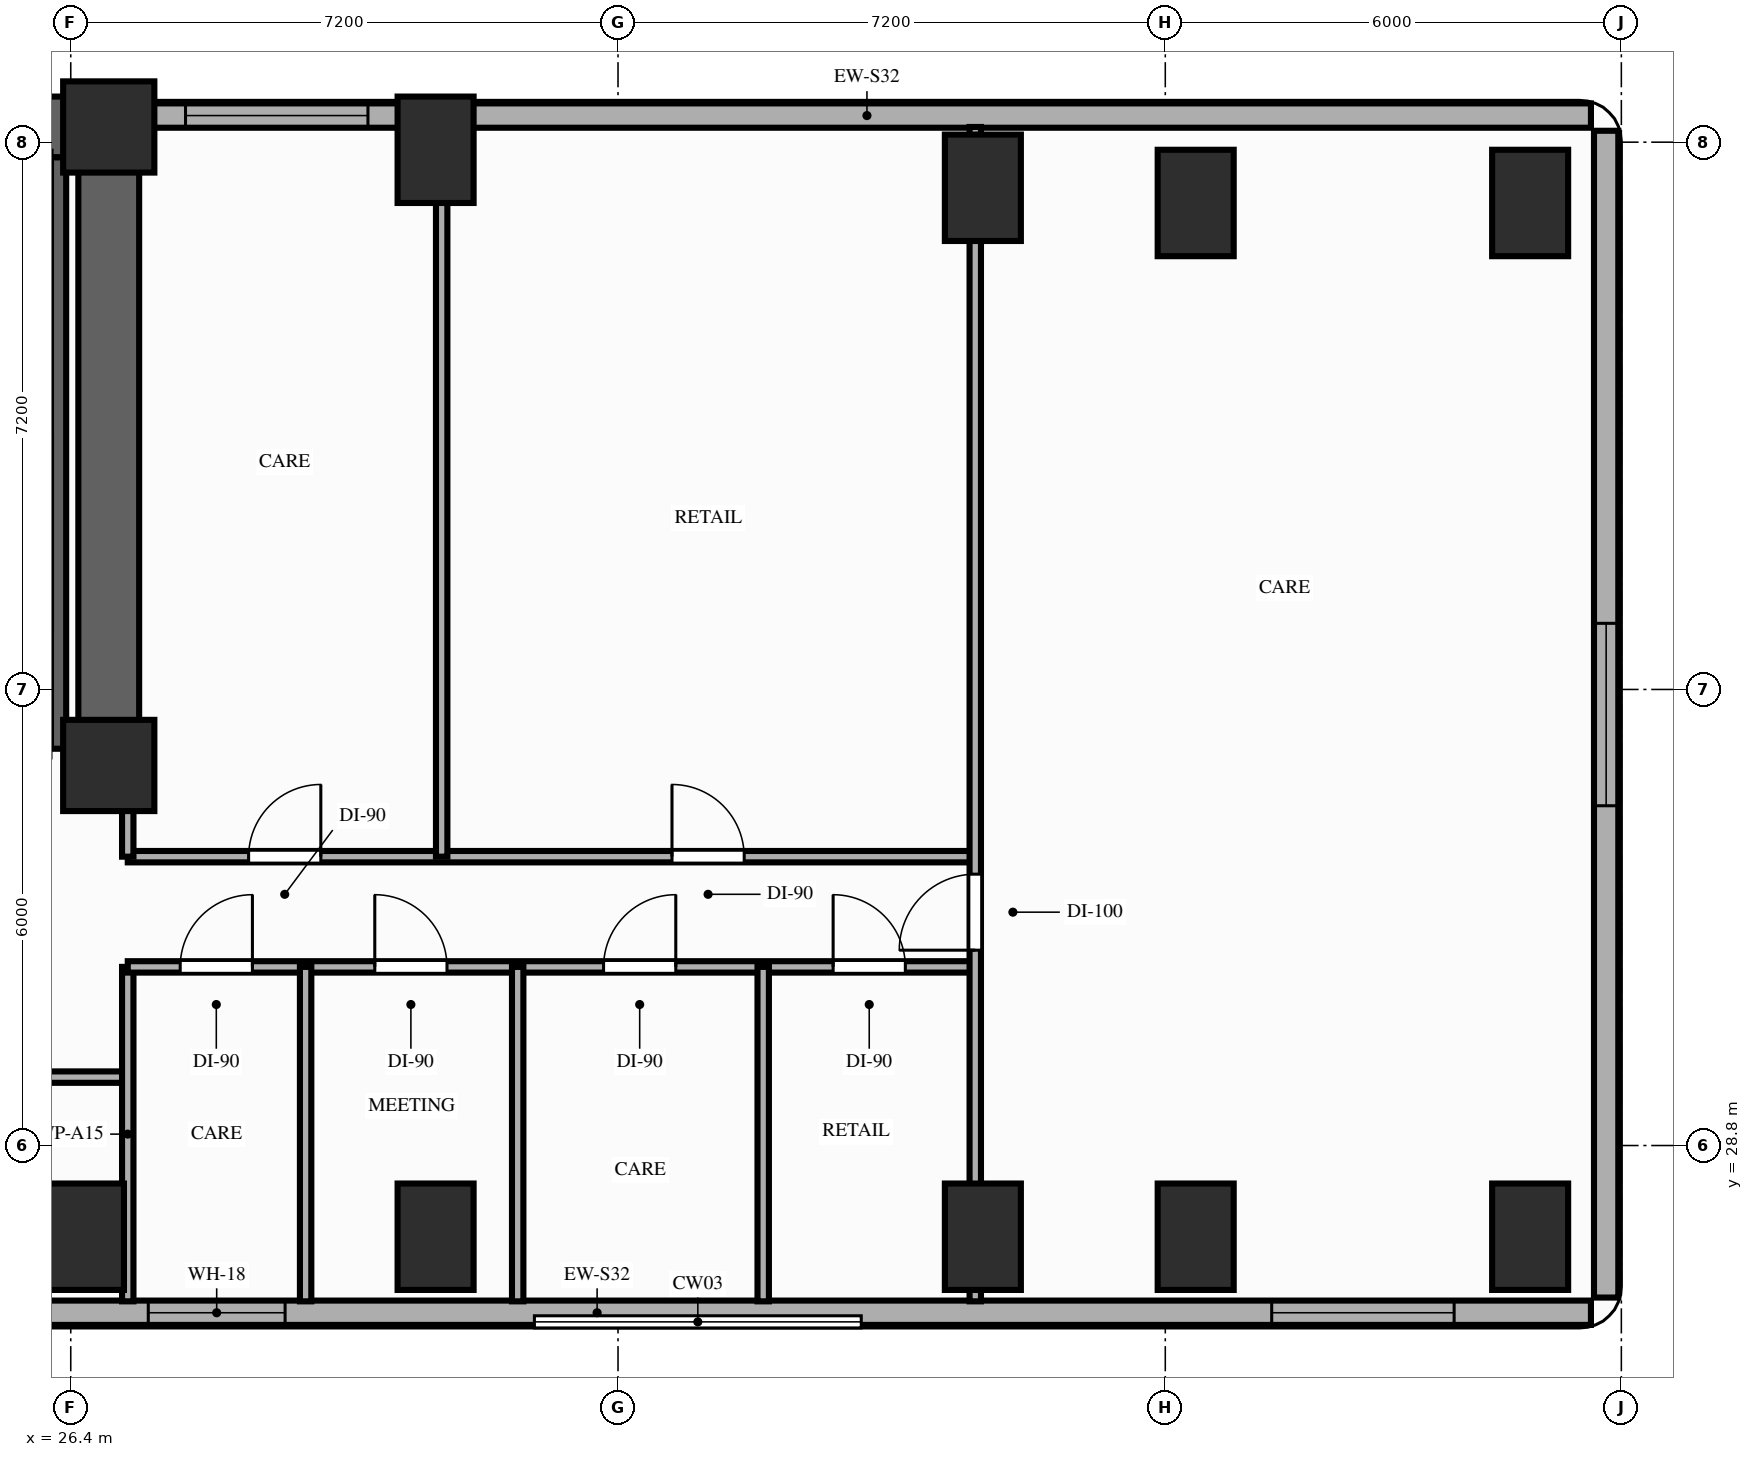
"""IFC4 building model, lengths in metres.
Left out: names, types, materials, properties, quantities, classifications, styles, units other than length and angle.
Written with IfcOpenShell. Run it as: python <this file> out.ifc"""

import sys

from ifc_helpers import new_model, si_unit, direction, frame, frame_2d, origin, origin_2d, place, context, subcontext, project, spatial, rectangle, extrude, element, fill, save


model = new_model("IFC4")
c1 = context("Model", 3, precision=1e-05, world=origin(), true_north=direction((0.0, 1.0)))
c2 = subcontext(c1, "Body", "Model", "MODEL_VIEW")
j1 = project(units=[si_unit("LENGTHUNIT", "METRE"), si_unit("PLANEANGLEUNIT", "RADIAN")], contexts=[c1])
p1 = place(None, origin())
s1 = spatial("IfcSite", under=j1, at=p1, CompositionType="ELEMENT")
p2 = place(p1, origin())
s2 = spatial("IfcBuilding", under=s1, at=p2, CompositionType="ELEMENT")
p3 = place(p2, frame((0.0, 0.0, 53.2)))
s3 = spatial("IfcBuildingStorey", under=s2, at=p3, CompositionType="ELEMENT", Elevation=53.2)
for number, where, z_axis, x_axis in (
    (1, (26.9, 33.8, 0.0), (0.0, 0.0, 1.0), (1.0, 0.0, 0.0)),
    (2, (26.9, 42.2, 0.0), (0.0, 0.0, 1.0), (1.0, 0.0, 0.0)),
):
    element("IfcColumn", number, at=place(p3, frame(where, z_axis=z_axis, x_axis=x_axis)), inside=s3, PredefinedType="COLUMN", context=c2, shape_type="SweptSolid", body=[
        extrude(rectangle(XDim=1.2, YDim=1.2, at=origin_2d()), origin(), (0.0, 0.0, 1.0), 3.2),
    ])
for number, where, z_axis, x_axis in (
    (3, (26.6, 27.6, 0.0), (0.0, 0.0, 1.0), (1.0, 0.0, 0.0)),
    (4, (31.2, 27.6, 0.0), (0.0, 0.0, 1.0), (1.0, 0.0, 0.0)),
    (5, (31.2, 41.9, 0.0), (0.0, 0.0, 1.0), (1.0, 0.0, 0.0)),
    (6, (38.4, 27.6, 0.0), (0.0, 0.0, 1.0), (1.0, 0.0, 0.0)),
    (7, (38.4, 41.4, 0.0), (0.0, 0.0, 1.0), (1.0, 0.0, 0.0)),
    (8, (41.2, 27.6, 0.0), (0.0, 0.0, 1.0), (1.0, 0.0, 0.0)),
    (9, (41.2, 41.2, 0.0), (0.0, 0.0, 1.0), (1.0, 0.0, 0.0)),
    (10, (45.6, 27.6, 0.0), (0.0, 0.0, 1.0), (1.0, 0.0, 0.0)),
    (11, (45.6, 41.2, 0.0), (0.0, 0.0, 1.0), (1.0, 0.0, 0.0)),
):
    element("IfcColumn", number, at=place(p3, frame(where, z_axis=z_axis, x_axis=x_axis)), inside=s3, PredefinedType="COLUMN", context=c2, shape_type="SweptSolid", body=[
        extrude(rectangle(XDim=1.0, YDim=1.4, at=origin_2d()), origin(), (0.0, 0.0, 1.0), 3.2),
    ])
p4 = place(p3, frame((46.4, 42.35, 0.0), z_axis=(0.0, 0.0, 1.0), x_axis=(-1.0, 0.0, 0.0)))
e12 = element("IfcWall", 12, at=p4, inside=s3, PredefinedType="STANDARD", context=c2, shape_type="SweptSolid", body=[
    extrude(rectangle(XDim=19.05, YDim=0.32, at=frame_2d((9.525, 0.0))), origin(), (0.0, 0.0, 1.0), 2.41),
])
p5 = place(p4, frame((16.09, 0.0, 0.85)))
e13 = element("IfcOpeningElement", 13, at=p5, cuts=e12, PredefinedType="OPENING", context=c2, shape_type="SweptSolid", body=[
    extrude(rectangle(XDim=2.4, YDim=1.31, at=frame_2d((1.2, 0.655))), frame((0.0, 0.17, 0.0), z_axis=(0.0, -1.0, 0.0), x_axis=(1.0, 0.0, 0.0)), (0.0, 0.0, 1.0), 0.34),
])
p6 = place(p3, frame((20.25, 26.6, 0.0), z_axis=(0.0, 0.0, 1.0), x_axis=(1.0, 0.0, 0.0)))
e14 = element("IfcWall", 14, at=p6, inside=s3, PredefinedType="STANDARD", context=c2, shape_type="SweptSolid", body=[
    extrude(rectangle(XDim=26.15, YDim=0.32, at=frame_2d((13.075, 0.0))), origin(), (0.0, 0.0, 1.0), 2.71),
])
p7 = place(p6, frame((2.35, 0.0, 0.85)))
e15 = element("IfcOpeningElement", 15, at=p7, cuts=e14, PredefinedType="OPENING", context=c2, shape_type="SweptSolid", body=[
    extrude(rectangle(XDim=2.4, YDim=1.61, at=frame_2d((1.2, 0.805))), frame((0.0, 0.17, 0.0), z_axis=(0.0, -1.0, 0.0), x_axis=(1.0, 0.0, 0.0)), (0.0, 0.0, 1.0), 0.34),
])
p8 = place(p6, frame((7.17, 0.0, 0.85)))
e16 = element("IfcOpeningElement", 16, at=p8, cuts=e14, PredefinedType="OPENING", context=c2, shape_type="SweptSolid", body=[
    extrude(rectangle(XDim=1.8, YDim=1.61, at=frame_2d((0.9, 0.805))), frame((0.0, 0.17, 0.0), z_axis=(0.0, -1.0, 0.0), x_axis=(1.0, 0.0, 0.0)), (0.0, 0.0, 1.0), 0.34),
])
p9 = place(p6, frame((21.95, 0.0, 0.85)))
e17 = element("IfcOpeningElement", 17, at=p9, cuts=e14, PredefinedType="OPENING", context=c2, shape_type="SweptSolid", body=[
    extrude(rectangle(XDim=2.4, YDim=1.61, at=frame_2d((1.2, 0.805))), frame((0.0, 0.17, 0.0), z_axis=(0.0, -1.0, 0.0), x_axis=(1.0, 0.0, 0.0)), (0.0, 0.0, 1.0), 0.34),
])
p10 = place(p3, frame((46.6, 26.8, 0.0), z_axis=(0.0, 0.0, 1.0), x_axis=(0.0, 1.0, 0.0)))
e18 = element("IfcWall", 18, at=p10, inside=s3, PredefinedType="STANDARD", context=c2, shape_type="SweptSolid", body=[
    extrude(rectangle(XDim=15.35, YDim=0.32, at=frame_2d((7.675, 0.0))), origin(), (0.0, 0.0, 1.0), 3.02),
])
p11 = place(p10, frame((6.47, 0.0, 0.85)))
e19 = element("IfcOpeningElement", 19, at=p11, cuts=e18, PredefinedType="OPENING", context=c2, shape_type="SweptSolid", body=[
    extrude(rectangle(XDim=2.4, YDim=1.8, at=frame_2d((1.2, 0.9))), frame((0.0, 0.17, 0.0), z_axis=(0.0, -1.0, 0.0), x_axis=(1.0, 0.0, 0.0)), (0.0, 0.0, 1.0), 0.34),
])
p12 = place(p3, frame((6.45, 42.2, 0.0), z_axis=(0.0, 0.0, 1.0), x_axis=(1.0, 0.0, 0.0)))
e20 = element("IfcWall", 20, at=p12, inside=s3, PredefinedType="SHEAR", context=c2, shape_type="SweptSolid", body=[
    extrude(rectangle(XDim=20.45, YDim=0.8, at=frame_2d((10.225, 0.0))), origin(), (0.0, 0.0, 1.0), 3.02),
])
p13 = place(p3, frame((26.9, 33.8, 0.0), z_axis=(0.0, 0.0, 1.0), x_axis=(0.0, 1.0, 0.0)))
e21 = element("IfcWall", 21, at=p13, inside=s3, PredefinedType="SHEAR", context=c2, shape_type="SweptSolid", body=[
    extrude(rectangle(XDim=7.95, YDim=0.8, at=frame_2d((3.975, 0.0))), origin(), (0.0, 0.0, 1.0), 3.02),
])
p14 = place(p3, frame((26.24, 34.02, 0.0), z_axis=(0.0, 0.0, 1.0), x_axis=(0.0, 1.0, 0.0)))
e22 = element("IfcWall", 22, at=p14, inside=s3, PredefinedType="SHEAR", context=c2, shape_type="SweptSolid", body=[
    extrude(rectangle(XDim=7.78, YDim=0.2, at=frame_2d((3.89, 0.0))), origin(), (0.0, 0.0, 1.0), 3.02),
])
p15 = place(p3, frame((20.45, 29.7, 0.0), z_axis=(0.0, 0.0, 1.0), x_axis=(1.0, 0.0, 0.0)))
e23 = element("IfcWall", 23, at=p15, inside=s3, PredefinedType="PARTITIONING", context=c2, shape_type="SweptSolid", body=[
    extrude(rectangle(XDim=6.7, YDim=0.15, at=frame_2d((3.35, 0.0))), origin(), (0.0, 0.0, 1.0), 3.02),
])
p16 = place(p15, frame((2.8, 0.0, 0.0)))
e24 = element("IfcOpeningElement", 24, at=p16, cuts=e23, PredefinedType="OPENING", context=c2, shape_type="SweptSolid", body=[
    extrude(rectangle(XDim=0.95, YDim=2.15, at=frame_2d((0.475, 1.075))), frame((0.0, 0.085, 0.0), z_axis=(0.0, -1.0, 0.0), x_axis=(1.0, 0.0, 0.0)), (0.0, 0.0, 1.0), 0.17),
])
p17 = place(p3, frame((27.15, 26.75, 0.0), z_axis=(0.0, 0.0, 1.0), x_axis=(0.0, 1.0, 0.0)))
e25 = element("IfcWall", 25, at=p17, inside=s3, PredefinedType="PARTITIONING", context=c2, shape_type="SweptSolid", body=[
    extrude(rectangle(XDim=4.4, YDim=0.15, at=frame_2d((2.2, 0.0))), origin(), (0.0, 0.0, 1.0), 2.41),
])
p18 = place(p3, frame((27.15, 31.15, 0.0), z_axis=(0.0, 0.0, 1.0), x_axis=(1.0, 0.0, 0.0)))
e26 = element("IfcWall", 26, at=p18, inside=s3, PredefinedType="PARTITIONING", context=c2, shape_type="SweptSolid", body=[
    extrude(rectangle(XDim=11.15, YDim=0.15, at=frame_2d((5.575, 0.0))), origin(), (0.0, 0.0, 1.0), 2.41),
])
p19 = place(p18, frame((0.69, 0.0, 0.0)))
e27 = element("IfcOpeningElement", 27, at=p19, cuts=e26, PredefinedType="OPENING", context=c2, shape_type="SweptSolid", body=[
    extrude(rectangle(XDim=0.95, YDim=2.15, at=frame_2d((0.475, 1.075))), frame((0.0, 0.085, 0.0), z_axis=(0.0, -1.0, 0.0), x_axis=(1.0, 0.0, 0.0)), (0.0, 0.0, 1.0), 0.17),
])
p20 = place(p18, frame((3.25, 0.0, 0.0)))
e28 = element("IfcOpeningElement", 28, at=p20, cuts=e26, PredefinedType="OPENING", context=c2, shape_type="SweptSolid", body=[
    extrude(rectangle(XDim=0.95, YDim=2.15, at=frame_2d((0.475, 1.075))), frame((0.0, 0.085, 0.0), z_axis=(0.0, -1.0, 0.0), x_axis=(1.0, 0.0, 0.0)), (0.0, 0.0, 1.0), 0.17),
])
p21 = place(p18, frame((6.26, 0.0, 0.0)))
e29 = element("IfcOpeningElement", 29, at=p21, cuts=e26, PredefinedType="OPENING", context=c2, shape_type="SweptSolid", body=[
    extrude(rectangle(XDim=0.95, YDim=2.15, at=frame_2d((0.475, 1.075))), frame((0.0, 0.085, 0.0), z_axis=(0.0, -1.0, 0.0), x_axis=(1.0, 0.0, 0.0)), (0.0, 0.0, 1.0), 0.17),
])
p22 = place(p18, frame((9.28, 0.0, 0.0)))
e30 = element("IfcOpeningElement", 30, at=p22, cuts=e26, PredefinedType="OPENING", context=c2, shape_type="SweptSolid", body=[
    extrude(rectangle(XDim=0.95, YDim=2.15, at=frame_2d((0.475, 1.075))), frame((0.0, 0.085, 0.0), z_axis=(0.0, -1.0, 0.0), x_axis=(1.0, 0.0, 0.0)), (0.0, 0.0, 1.0), 0.17),
])
p23 = place(p3, frame((27.15, 32.6, 0.0), z_axis=(0.0, 0.0, 1.0), x_axis=(1.0, 0.0, 0.0)))
e31 = element("IfcWall", 31, at=p23, inside=s3, PredefinedType="PARTITIONING", context=c2, shape_type="SweptSolid", body=[
    extrude(rectangle(XDim=11.15, YDim=0.15, at=frame_2d((5.575, 0.0))), origin(), (0.0, 0.0, 1.0), 2.41),
])
p24 = place(p23, frame((1.59, 0.0, 0.0)))
e32 = element("IfcOpeningElement", 32, at=p24, cuts=e31, PredefinedType="OPENING", context=c2, shape_type="SweptSolid", body=[
    extrude(rectangle(XDim=0.95, YDim=2.15, at=frame_2d((0.475, 1.075))), frame((0.0, 0.085, 0.0), z_axis=(0.0, -1.0, 0.0), x_axis=(1.0, 0.0, 0.0)), (0.0, 0.0, 1.0), 0.17),
])
p25 = place(p23, frame((7.16, 0.0, 0.0)))
e33 = element("IfcOpeningElement", 33, at=p25, cuts=e31, PredefinedType="OPENING", context=c2, shape_type="SweptSolid", body=[
    extrude(rectangle(XDim=0.95, YDim=2.15, at=frame_2d((0.475, 1.075))), frame((0.0, 0.085, 0.0), z_axis=(0.0, -1.0, 0.0), x_axis=(1.0, 0.0, 0.0)), (0.0, 0.0, 1.0), 0.17),
])
p26 = place(p3, frame((27.15, 32.6, 0.0), z_axis=(0.0, 0.0, 1.0), x_axis=(0.0, 1.0, 0.0)))
e34 = element("IfcWall", 34, at=p26, inside=s3, PredefinedType="PARTITIONING", context=c2, shape_type="SweptSolid", body=[
    extrude(rectangle(XDim=1.08, YDim=0.15, at=frame_2d((0.54, 0.0))), origin(), (0.0, 0.0, 1.0), 2.41),
])
p27 = place(p3, frame((38.3, 26.75, 0.0), z_axis=(0.0, 0.0, 1.0), x_axis=(0.0, 1.0, 0.0)))
e35 = element("IfcWall", 35, at=p27, inside=s3, PredefinedType="PARTITIONING", context=c2, shape_type="SweptSolid", body=[
    extrude(rectangle(XDim=15.45, YDim=0.15, at=frame_2d((7.725, 0.0))), origin(), (0.0, 0.0, 1.0), 2.41),
])
p28 = place(p27, frame((4.62, 0.0, 0.0)))
e36 = element("IfcOpeningElement", 36, at=p28, cuts=e35, PredefinedType="OPENING", context=c2, shape_type="SweptSolid", body=[
    extrude(rectangle(XDim=1.0, YDim=2.15, at=frame_2d((0.5, 1.075))), frame((0.0, 0.085, 0.0), z_axis=(0.0, -1.0, 0.0), x_axis=(1.0, 0.0, 0.0)), (0.0, 0.0, 1.0), 0.17),
])
for number, where, z_axis, x_axis in (
    (37, (29.49, 26.75, 0.0), (0.0, 0.0, 1.0), (0.0, 1.0, 0.0)),
    (38, (32.28, 26.75, 0.0), (0.0, 0.0, 1.0), (0.0, 1.0, 0.0)),
    (39, (35.51, 26.75, 0.0), (0.0, 0.0, 1.0), (0.0, 1.0, 0.0)),
):
    element("IfcWall", number, at=place(p3, frame(where, z_axis=z_axis, x_axis=x_axis)), inside=s3, PredefinedType="PARTITIONING", context=c2, shape_type="SweptSolid", body=[
        extrude(rectangle(XDim=4.4, YDim=0.15, at=frame_2d((2.2, 0.0))), origin(), (0.0, 0.0, 1.0), 2.41),
    ])
p29 = place(p3, frame((31.28, 32.6, 0.0), z_axis=(0.0, 0.0, 1.0), x_axis=(0.0, 1.0, 0.0)))
e40 = element("IfcWall", 40, at=p29, inside=s3, PredefinedType="PARTITIONING", context=c2, shape_type="SweptSolid", body=[
    extrude(rectangle(XDim=9.6, YDim=0.15, at=frame_2d((4.8, 0.0))), origin(), (0.0, 0.0, 1.0), 2.41),
])
p30 = place(p11, origin())
e41 = element("IfcWindow", 41, at=p30, inside=s3, PartitioningType="SINGLE_PANEL", PredefinedType="WINDOW", context=c2, shape_type="SweptSolid", body=[
    extrude(rectangle(XDim=2.4, YDim=1.8, at=frame_2d((1.2, 0.9))), frame((0.0, 0.03, 0.0), z_axis=(0.0, -1.0, 0.0), x_axis=(1.0, 0.0, 0.0)), (0.0, 0.0, 1.0), 0.06),
])
fill(e19, e41)
p31 = place(p8, origin())
e42 = element("IfcWindow", 42, at=p31, inside=s3, PartitioningType="SINGLE_PANEL", PredefinedType="WINDOW", context=c2, shape_type="SweptSolid", body=[
    extrude(rectangle(XDim=1.8, YDim=1.61, at=frame_2d((0.9, 0.805))), frame((0.0, 0.03, 0.0), z_axis=(0.0, -1.0, 0.0), x_axis=(1.0, 0.0, 0.0)), (0.0, 0.0, 1.0), 0.06),
])
fill(e16, e42)
p32 = place(p5, origin())
e43 = element("IfcWindow", 43, at=p32, inside=s3, PartitioningType="SINGLE_PANEL", PredefinedType="WINDOW", context=c2, shape_type="SweptSolid", body=[
    extrude(rectangle(XDim=2.4, YDim=1.31, at=frame_2d((1.2, 0.655))), frame((0.0, 0.03, 0.0), z_axis=(0.0, -1.0, 0.0), x_axis=(1.0, 0.0, 0.0)), (0.0, 0.0, 1.0), 0.06),
])
fill(e13, e43)
p33 = place(p9, origin())
e44 = element("IfcWindow", 44, at=p33, inside=s3, PartitioningType="SINGLE_PANEL", PredefinedType="WINDOW", context=c2, shape_type="SweptSolid", body=[
    extrude(rectangle(XDim=2.4, YDim=1.61, at=frame_2d((1.2, 0.805))), frame((0.0, 0.03, 0.0), z_axis=(0.0, -1.0, 0.0), x_axis=(1.0, 0.0, 0.0)), (0.0, 0.0, 1.0), 0.06),
])
fill(e17, e44)
p34 = place(p28, origin())
e45 = element("IfcDoor", 45, at=p34, inside=s3, OperationType="SINGLE_SWING_LEFT", PredefinedType="DOOR", context=c2, shape_type="SweptSolid", body=[
    extrude(rectangle(XDim=1.0, YDim=2.15, at=frame_2d((0.5, 1.075))), frame((0.0, 0.025, 0.0), z_axis=(0.0, -1.0, 0.0), x_axis=(1.0, 0.0, 0.0)), (0.0, 0.0, 1.0), 0.05),
])
fill(e36, e45)
p35 = place(p19, origin())
e46 = element("IfcDoor", 46, at=p35, inside=s3, OperationType="SINGLE_SWING_RIGHT", PredefinedType="DOOR", context=c2, shape_type="SweptSolid", body=[
    extrude(rectangle(XDim=0.95, YDim=2.15, at=frame_2d((0.475, 1.075))), frame((0.0, 0.025, 0.0), z_axis=(0.0, -1.0, 0.0), x_axis=(1.0, 0.0, 0.0)), (0.0, 0.0, 1.0), 0.05),
])
fill(e27, e46)
p36 = place(p20, origin())
e47 = element("IfcDoor", 47, at=p36, inside=s3, OperationType="SINGLE_SWING_LEFT", PredefinedType="DOOR", context=c2, shape_type="SweptSolid", body=[
    extrude(rectangle(XDim=0.95, YDim=2.15, at=frame_2d((0.475, 1.075))), frame((0.0, 0.025, 0.0), z_axis=(0.0, -1.0, 0.0), x_axis=(1.0, 0.0, 0.0)), (0.0, 0.0, 1.0), 0.05),
])
fill(e28, e47)
p37 = place(p21, origin())
e48 = element("IfcDoor", 48, at=p37, inside=s3, OperationType="SINGLE_SWING_RIGHT", PredefinedType="DOOR", context=c2, shape_type="SweptSolid", body=[
    extrude(rectangle(XDim=0.95, YDim=2.15, at=frame_2d((0.475, 1.075))), frame((0.0, 0.025, 0.0), z_axis=(0.0, -1.0, 0.0), x_axis=(1.0, 0.0, 0.0)), (0.0, 0.0, 1.0), 0.05),
])
fill(e29, e48)
p38 = place(p22, origin())
e49 = element("IfcDoor", 49, at=p38, inside=s3, OperationType="SINGLE_SWING_LEFT", PredefinedType="DOOR", context=c2, shape_type="SweptSolid", body=[
    extrude(rectangle(XDim=0.95, YDim=2.15, at=frame_2d((0.475, 1.075))), frame((0.0, 0.025, 0.0), z_axis=(0.0, -1.0, 0.0), x_axis=(1.0, 0.0, 0.0)), (0.0, 0.0, 1.0), 0.05),
])
fill(e30, e49)
p39 = place(p24, origin())
e50 = element("IfcDoor", 50, at=p39, inside=s3, OperationType="SINGLE_SWING_RIGHT", PredefinedType="DOOR", context=c2, shape_type="SweptSolid", body=[
    extrude(rectangle(XDim=0.95, YDim=2.15, at=frame_2d((0.475, 1.075))), frame((0.0, 0.025, 0.0), z_axis=(0.0, -1.0, 0.0), x_axis=(1.0, 0.0, 0.0)), (0.0, 0.0, 1.0), 0.05),
])
fill(e32, e50)
p40 = place(p25, origin())
e51 = element("IfcDoor", 51, at=p40, inside=s3, OperationType="SINGLE_SWING_LEFT", PredefinedType="DOOR", context=c2, shape_type="SweptSolid", body=[
    extrude(rectangle(XDim=0.95, YDim=2.15, at=frame_2d((0.475, 1.075))), frame((0.0, 0.025, 0.0), z_axis=(0.0, -1.0, 0.0), x_axis=(1.0, 0.0, 0.0)), (0.0, 0.0, 1.0), 0.05),
])
fill(e33, e51)
save(model, sys.argv[1])
